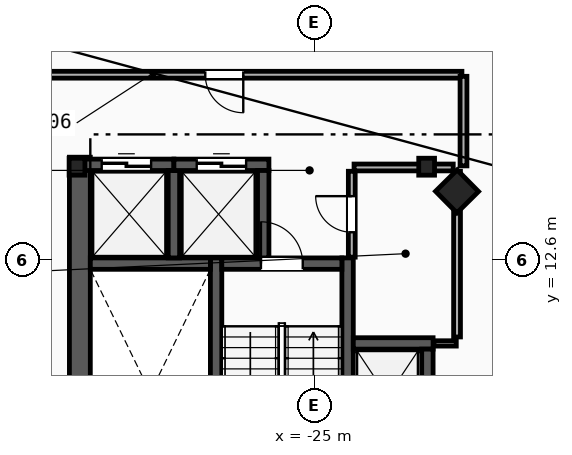
"""IFC4 building model, lengths in metres.
Left out: names, types, materials, properties, quantities, classifications, styles, units other than length and angle.
Written with IfcOpenShell. Run it as: python <this file> out.ifc"""

import sys

from ifc_helpers import new_model, si_unit, direction, frame, frame_2d, origin, origin_2d, place, context, subcontext, project, spatial, rectangle, i_section, extrude, element, fill, save


model = new_model("IFC4")
c1 = context("Model", 3, precision=1e-05, world=origin(), true_north=direction((0.0, 1.0)))
c2 = subcontext(c1, "Body", "Model", "MODEL_VIEW")
j1 = project(units=[si_unit("LENGTHUNIT", "METRE"), si_unit("PLANEANGLEUNIT", "RADIAN")], contexts=[c1])
p1 = place(None, origin())
s1 = spatial("IfcSite", under=j1, at=p1, CompositionType="ELEMENT")
p2 = place(p1, origin())
s2 = spatial("IfcBuilding", under=s1, at=p2, CompositionType="ELEMENT")
p3 = place(p2, frame((0.0, 0.0, 257.6)))
s3 = spatial("IfcBuildingStorey", under=s2, at=p3, CompositionType="ELEMENT", Elevation=257.6)
for number, where, z_axis, x_axis in (
    (1, (-22.05, 15.05, 0.0), (0.0, 0.0, 1.0), (1.0, 0.0, 0.0)),
    (2, (-31.25, 15.05, 0.0), (0.0, 0.0, 1.0), (1.0, 0.0, 0.0)),
):
    element("IfcColumn", number, at=place(p3, frame(where, z_axis=z_axis, x_axis=x_axis)), inside=s3, PredefinedType="COLUMN", context=c2, shape_type="SweptSolid", body=[
        extrude(i_section(OverallWidth=0.416, OverallDepth=0.446, WebThickness=0.039, FlangeThickness=0.063, FilletRadius=0.018, at=origin_2d()), origin(), (0.0, 0.0, 1.0), 3.6),
    ])
p4 = place(p3, frame((-21.25, 14.4, 0.0), z_axis=(0.0, 0.0, 1.0), x_axis=(-0.703270634186, 0.710922228581, 0.0)))
e3 = element("IfcColumn", 3, at=p4, inside=s3, PredefinedType="COLUMN", context=c2, shape_type="SweptSolid", body=[
    extrude(rectangle(XDim=0.8, YDim=0.8, at=origin_2d()), origin(), (0.0, 0.0, 1.0), 3.6),
])
p5 = place(p3, frame((-31.175, 1.97, 0.0), z_axis=(0.0, 0.0, 1.0), x_axis=(0.0, 1.0, 0.0)))
e4 = element("IfcWall", 4, at=p5, inside=s3, PredefinedType="SHEAR", context=c2, shape_type="SweptSolid", body=[
    extrude(rectangle(XDim=13.33, YDim=0.55, at=frame_2d((6.665, 0.0))), origin(), (0.0, 0.0, 1.0), 3.34),
])
for number, where, z_axis, x_axis in (
    (5, (-27.59, 1.97, 0.0), (0.0, 0.0, 1.0), (0.0, 1.0, 0.0)),
    (6, (-24.13, 1.97, 0.0), (0.0, 0.0, 1.0), (0.0, 1.0, 0.0)),
):
    element("IfcWall", number, at=place(p3, frame(where, z_axis=z_axis, x_axis=x_axis)), inside=s3, PredefinedType="SHEAR", context=c2, shape_type="SweptSolid", body=[
        extrude(rectangle(XDim=10.68, YDim=0.3, at=frame_2d((5.34, 0.0))), origin(), (0.0, 0.0, 1.0), 3.34),
    ])
p6 = place(p3, frame((-30.9, 12.5, 0.0), z_axis=(0.0, 0.0, 1.0), x_axis=(1.0, 0.0, 0.0)))
e7 = element("IfcWall", 7, at=p6, inside=s3, PredefinedType="SHEAR", context=c2, shape_type="SweptSolid", body=[
    extrude(rectangle(XDim=3.16, YDim=0.3, at=frame_2d((1.58, 0.0))), origin(), (0.0, 0.0, 1.0), 3.34),
])
p7 = place(p3, frame((-27.44, 12.5, 0.0), z_axis=(0.0, 0.0, 1.0), x_axis=(1.0, 0.0, 0.0)))
e8 = element("IfcWall", 8, at=p7, inside=s3, PredefinedType="SHEAR", context=c2, shape_type="SweptSolid", body=[
    extrude(rectangle(XDim=3.16, YDim=0.3, at=frame_2d((1.58, 0.0))), origin(), (0.0, 0.0, 1.0), 3.34),
])
p8 = place(p7, frame((1.03, 0.0, 0.0)))
e9 = element("IfcOpeningElement", 9, at=p8, cuts=e8, PredefinedType="OPENING", context=c2, shape_type="SweptSolid", body=[
    extrude(rectangle(XDim=1.1, YDim=2.15, at=frame_2d((0.55, 1.075))), frame((0.0, 0.16, 0.0), z_axis=(0.0, -1.0, 0.0), x_axis=(1.0, 0.0, 0.0)), (0.0, 0.0, 1.0), 0.32),
])
p9 = place(p3, frame((-23.98, 10.4, 0.0), z_axis=(0.0, 0.0, 1.0), x_axis=(1.0, 0.0, 0.0)))
e10 = element("IfcWall", 10, at=p9, inside=s3, PredefinedType="SHEAR", context=c2, shape_type="SweptSolid", body=[
    extrude(rectangle(XDim=2.1, YDim=0.3, at=frame_2d((1.05, 0.0))), origin(), (0.0, 0.0, 1.0), 3.34),
])
p10 = place(p3, frame((-22.03, 7.75, 0.0), z_axis=(0.0, 0.0, 1.0), x_axis=(0.0, 1.0, 0.0)))
e11 = element("IfcWall", 11, at=p10, inside=s3, PredefinedType="SHEAR", context=c2, shape_type="SweptSolid", body=[
    extrude(rectangle(XDim=2.5, YDim=0.3, at=frame_2d((1.25, 0.0))), origin(), (0.0, 0.0, 1.0), 3.34),
])
p11 = place(p3, frame((-31.2, 15.1, 0.0), z_axis=(0.0, 0.0, 1.0), x_axis=(1.0, 0.0, 0.0)))
e12 = element("IfcWall", 12, at=p11, inside=s3, PredefinedType="SHEAR", context=c2, shape_type="SweptSolid", body=[
    extrude(rectangle(XDim=2.5, YDim=0.3, at=frame_2d((1.25, 0.0))), origin(), (0.0, 0.0, 1.0), 3.34),
])
p12 = place(p11, frame((0.6, 0.0, 0.0)))
e13 = element("IfcOpeningElement", 13, at=p12, cuts=e12, PredefinedType="OPENING", context=c2, shape_type="SweptSolid", body=[
    extrude(rectangle(XDim=1.3, YDim=2.2, at=frame_2d((0.65, 1.1))), frame((0.0, 0.16, 0.0), z_axis=(0.0, -1.0, 0.0), x_axis=(1.0, 0.0, 0.0)), (0.0, 0.0, 1.0), 0.32),
])
p13 = place(p3, frame((-28.7, 12.65, 0.0), z_axis=(0.0, 0.0, 1.0), x_axis=(0.0, 1.0, 0.0)))
e14 = element("IfcWall", 14, at=p13, inside=s3, PredefinedType="SHEAR", context=c2, shape_type="SweptSolid", body=[
    extrude(rectangle(XDim=2.3, YDim=0.3, at=frame_2d((1.15, 0.0))), origin(), (0.0, 0.0, 1.0), 3.34),
])
p14 = place(p3, frame((-28.7, 15.1, 0.0), z_axis=(0.0, 0.0, 1.0), x_axis=(1.0, 0.0, 0.0)))
e15 = element("IfcWall", 15, at=p14, inside=s3, PredefinedType="SHEAR", context=c2, shape_type="SweptSolid", body=[
    extrude(rectangle(XDim=2.5, YDim=0.3, at=frame_2d((1.25, 0.0))), origin(), (0.0, 0.0, 1.0), 3.34),
])
p15 = place(p14, frame((0.6, 0.0, 0.0)))
e16 = element("IfcOpeningElement", 16, at=p15, cuts=e15, PredefinedType="OPENING", context=c2, shape_type="SweptSolid", body=[
    extrude(rectangle(XDim=1.3, YDim=2.2, at=frame_2d((0.65, 1.1))), frame((0.0, 0.16, 0.0), z_axis=(0.0, -1.0, 0.0), x_axis=(1.0, 0.0, 0.0)), (0.0, 0.0, 1.0), 0.32),
])
p16 = place(p3, frame((-26.35, 12.65, 0.0), z_axis=(0.0, 0.0, 1.0), x_axis=(0.0, 1.0, 0.0)))
e17 = element("IfcWall", 17, at=p16, inside=s3, PredefinedType="SHEAR", context=c2, shape_type="SweptSolid", body=[
    extrude(rectangle(XDim=2.3, YDim=0.3, at=frame_2d((1.15, 0.0))), origin(), (0.0, 0.0, 1.0), 3.34),
])
p17 = place(p3, frame((-21.86, 10.4, 0.0), z_axis=(0.0, 0.0, 1.0), x_axis=(1.0, 0.0, 0.0)))
e18 = element("IfcWall", 18, at=p17, inside=s3, PredefinedType="PARTITIONING", context=c2, shape_type="SweptSolid", body=[
    extrude(rectangle(XDim=0.59, YDim=0.14, at=frame_2d((0.295, 0.0))), origin(), (0.0, 0.0, 1.0), 3.34),
])
p18 = place(p3, frame((-21.25, 10.57, 0.0), z_axis=(0.0, 0.0, 1.0), x_axis=(0.0, 1.0, 0.0)))
e19 = element("IfcWall", 19, at=p18, inside=s3, PredefinedType="PARTITIONING", context=c2, shape_type="SweptSolid", body=[
    extrude(rectangle(XDim=4.36, YDim=0.18, at=frame_2d((2.18, 0.0))), origin(), (0.0, 0.0, 1.0), 3.34),
])
p19 = place(p3, frame((-23.96, 15.03, 0.0), z_axis=(0.0, 0.0, 1.0), x_axis=(1.0, 0.0, 0.0)))
e20 = element("IfcWall", 20, at=p19, inside=s3, PredefinedType="PARTITIONING", context=c2, shape_type="SweptSolid", body=[
    extrude(rectangle(XDim=2.61, YDim=0.18, at=frame_2d((1.305, 0.0))), origin(), (0.0, 0.0, 1.0), 2.413),
])
p20 = place(p3, frame((-24.02, 12.67, 0.0), z_axis=(0.0, 0.0, 1.0), x_axis=(0.0, 1.0, 0.0)))
e21 = element("IfcWall", 21, at=p20, inside=s3, PredefinedType="PARTITIONING", context=c2, shape_type="SweptSolid", body=[
    extrude(rectangle(XDim=2.26, YDim=0.18, at=frame_2d((1.13, 0.0))), origin(), (0.0, 0.0, 1.0), 3.34),
])
p21 = place(p20, frame((0.655, 0.0, 0.0)))
e22 = element("IfcOpeningElement", 22, at=p21, cuts=e21, PredefinedType="OPENING", context=c2, shape_type="SweptSolid", body=[
    extrude(rectangle(XDim=0.95, YDim=2.1, at=frame_2d((0.475, 1.05))), frame((0.0, 0.1, 0.0), z_axis=(0.0, -1.0, 0.0), x_axis=(1.0, 0.0, 0.0)), (0.0, 0.0, 1.0), 0.2),
])
p22 = place(p3, frame((-21.122, 17.47, 0.0), z_axis=(0.0, 0.0, 1.0), x_axis=(-1.0, 0.0, 0.0)))
e23 = element("IfcWall", 23, at=p22, inside=s3, PredefinedType="PARTITIONING", context=c2, shape_type="SweptSolid", body=[
    extrude(rectangle(XDim=12.507, YDim=0.18, at=frame_2d((6.253, 0.0))), origin(), (0.0, 0.0, 1.0), 3.34),
])
p23 = place(p22, frame((5.753, 0.0, 0.0)))
e24 = element("IfcOpeningElement", 24, at=p23, cuts=e23, PredefinedType="OPENING", context=c2, shape_type="SweptSolid", body=[
    extrude(rectangle(XDim=1.0, YDim=2.15, at=frame_2d((0.5, 1.075))), frame((0.0, 0.1, 0.0), z_axis=(0.0, -1.0, 0.0), x_axis=(1.0, 0.0, 0.0)), (0.0, 0.0, 1.0), 0.2),
])
p24 = place(p3, frame((-21.08, 15.072, 0.0), z_axis=(0.0, 0.0, 1.0), x_axis=(0.0, 1.0, 0.0)))
e25 = element("IfcWall", 25, at=p24, inside=s3, PredefinedType="PARTITIONING", context=c2, shape_type="SweptSolid", body=[
    extrude(rectangle(XDim=2.357, YDim=0.18, at=frame_2d((1.178, 0.0))), origin(), (0.0, 0.0, 1.0), 3.34),
])
p25 = place(p8, origin())
e26 = element("IfcDoor", 26, at=p25, inside=s3, OperationType="SINGLE_SWING_LEFT", PredefinedType="DOOR", context=c2, shape_type="SweptSolid", body=[
    extrude(rectangle(XDim=1.1, YDim=2.15, at=frame_2d((0.55, 1.075))), frame((0.0, 0.025, 0.0), z_axis=(0.0, -1.0, 0.0), x_axis=(1.0, 0.0, 0.0)), (0.0, 0.0, 1.0), 0.05),
])
fill(e9, e26)
p26 = place(p12, origin())
e27 = element("IfcDoor", 27, at=p26, inside=s3, OperationType="SLIDING_TO_LEFT", PredefinedType="TRAPDOOR", context=c2, shape_type="SweptSolid", body=[
    extrude(rectangle(XDim=1.3, YDim=2.2, at=frame_2d((0.65, 1.1))), frame((0.0, 0.025, 0.0), z_axis=(0.0, -1.0, 0.0), x_axis=(1.0, 0.0, 0.0)), (0.0, 0.0, 1.0), 0.05),
])
fill(e13, e27)
p27 = place(p15, origin())
e28 = element("IfcDoor", 28, at=p27, inside=s3, OperationType="SLIDING_TO_LEFT", PredefinedType="TRAPDOOR", context=c2, shape_type="SweptSolid", body=[
    extrude(rectangle(XDim=1.3, YDim=2.2, at=frame_2d((0.65, 1.1))), frame((0.0, 0.025, 0.0), z_axis=(0.0, -1.0, 0.0), x_axis=(1.0, 0.0, 0.0)), (0.0, 0.0, 1.0), 0.05),
])
fill(e16, e28)
p28 = place(p23, origin())
e29 = element("IfcDoor", 29, at=p28, inside=s3, OperationType="SINGLE_SWING_LEFT", PredefinedType="DOOR", context=c2, shape_type="SweptSolid", body=[
    extrude(rectangle(XDim=1.0, YDim=2.15, at=frame_2d((0.5, 1.075))), frame((0.0, 0.025, 0.0), z_axis=(0.0, -1.0, 0.0), x_axis=(1.0, 0.0, 0.0)), (0.0, 0.0, 1.0), 0.05),
])
fill(e24, e29)
p29 = place(p21, origin())
e30 = element("IfcDoor", 30, at=p29, inside=s3, OperationType="SINGLE_SWING_RIGHT", PredefinedType="DOOR", context=c2, shape_type="SweptSolid", body=[
    extrude(rectangle(XDim=0.95, YDim=2.1, at=frame_2d((0.475, 1.05))), frame((0.0, 0.025, 0.0), z_axis=(0.0, -1.0, 0.0), x_axis=(1.0, 0.0, 0.0)), (0.0, 0.0, 1.0), 0.05),
])
fill(e22, e30)
save(model, sys.argv[1])
